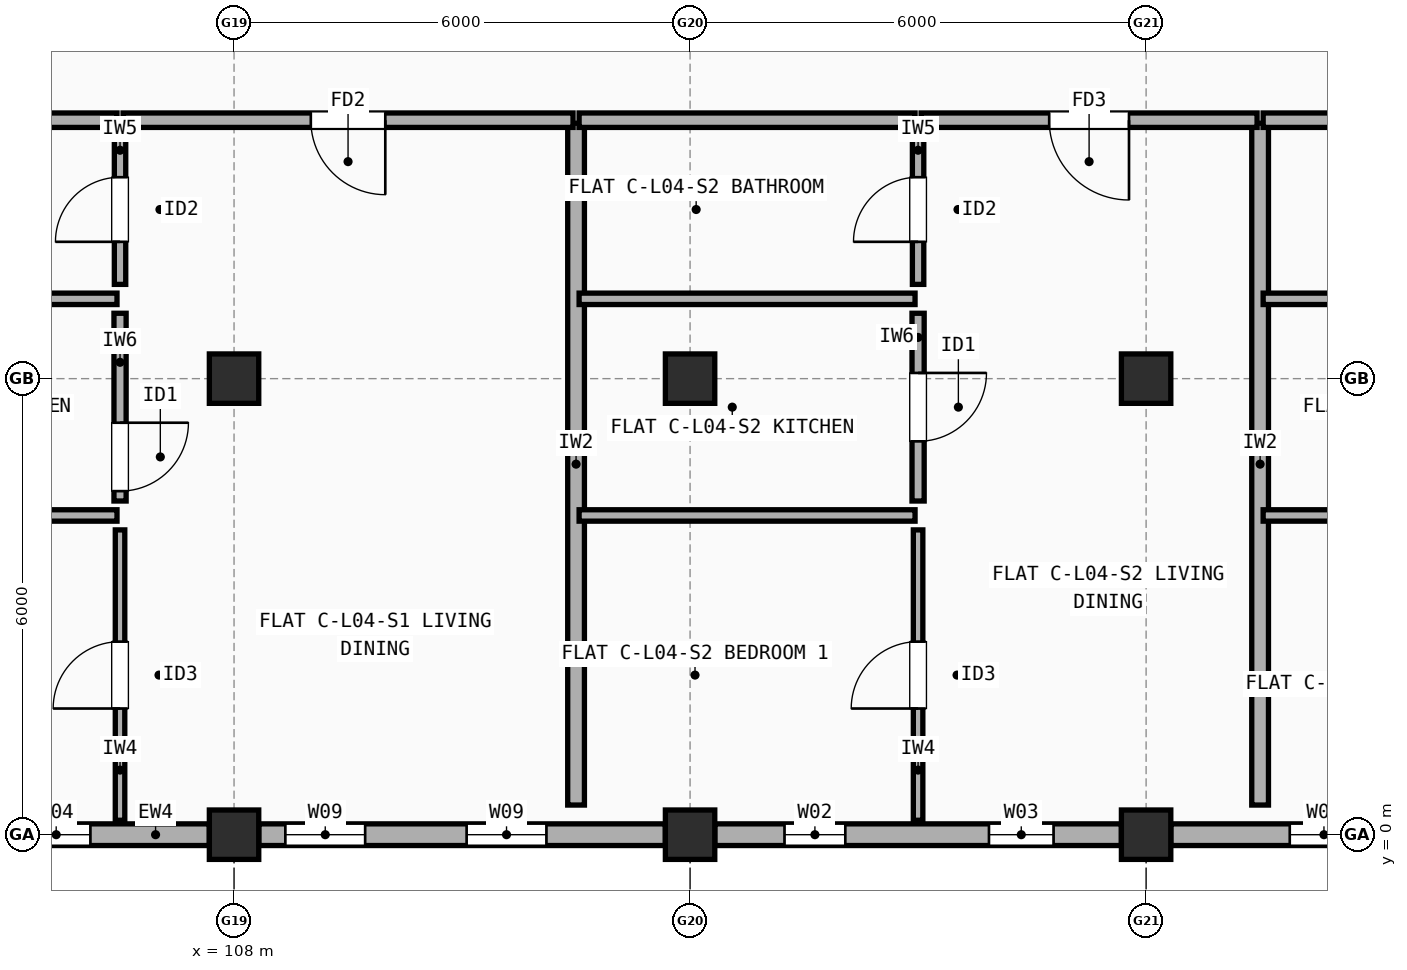
"""IFC4 building model, lengths in metres.
Left out: names, types, materials, properties, quantities, classifications, styles, units other than length and angle.
Written with IfcOpenShell. Run it as: python <this file> out.ifc"""

import sys

from ifc_helpers import new_model, si_unit, direction, frame, frame_2d, origin, origin_2d, place, context, subcontext, project, spatial, rectangle, extrude, element, fill, save


model = new_model("IFC4")
c1 = context("Model", 3, precision=1e-05, world=origin(), true_north=direction((0.0, 1.0)))
c2 = subcontext(c1, "Body", "Model", "MODEL_VIEW")
j1 = project(units=[si_unit("LENGTHUNIT", "METRE"), si_unit("PLANEANGLEUNIT", "RADIAN")], contexts=[c1])
p1 = place(None, origin())
s1 = spatial("IfcSite", under=j1, at=p1, CompositionType="ELEMENT")
p2 = place(p1, origin())
s2 = spatial("IfcBuilding", under=s1, at=p2, CompositionType="ELEMENT")
p3 = place(p2, frame((0.0, 0.0, 14.1)))
s3 = spatial("IfcBuildingStorey", under=s2, at=p3, CompositionType="ELEMENT", Elevation=14.1)
for number, where, z_axis, x_axis in (
    (1, (108.0, 0.0, 0.0), (0.0, 0.0, 1.0), (1.0, 0.0, 0.0)),
    (2, (108.0, 6.0, 0.0), (0.0, 0.0, 1.0), (1.0, 0.0, 0.0)),
    (3, (114.0, 0.0, 0.0), (0.0, 0.0, 1.0), (1.0, 0.0, 0.0)),
    (4, (114.0, 6.0, 0.0), (0.0, 0.0, 1.0), (1.0, 0.0, 0.0)),
    (5, (120.0, 0.0, 0.0), (0.0, 0.0, 1.0), (1.0, 0.0, 0.0)),
    (6, (120.0, 6.0, 0.0), (0.0, 0.0, 1.0), (1.0, 0.0, 0.0)),
):
    element("IfcColumn", number, at=place(p3, frame(where, z_axis=z_axis, x_axis=x_axis)), inside=s3, PredefinedType="COLUMN", context=c2, shape_type="SweptSolid", body=[
        extrude(rectangle(XDim=0.65, YDim=0.65, at=origin_2d()), origin(), (0.0, 0.0, 1.0), 2.95),
    ])
p4 = place(p3, frame((102.275, 0.0, 0.0), z_axis=(0.0, 0.0, 1.0), x_axis=(1.0, 0.0, 0.0)))
e7 = element("IfcWall", 7, at=p4, inside=s3, PredefinedType="STANDARD", context=c2, shape_type="SweptSolid", body=[
    extrude(rectangle(XDim=5.4, YDim=0.285, at=frame_2d((2.7, 0.0))), origin(), (0.0, 0.0, 1.0), 2.432),
])
p5 = place(p4, frame((0.35, 0.0, 0.9)))
e8 = element("IfcOpeningElement", 8, at=p5, cuts=e7, PredefinedType="OPENING", context=c2, shape_type="SweptSolid", body=[
    extrude(rectangle(XDim=0.9, YDim=1.3, at=frame_2d((0.45, 0.65))), frame((0.0, 0.152, 0.0), z_axis=(0.0, -1.0, 0.0), x_axis=(1.0, 0.0, 0.0)), (0.0, 0.0, 1.0), 0.305),
])
p6 = place(p4, frame((2.935, 0.0, 0.9)))
e9 = element("IfcOpeningElement", 9, at=p6, cuts=e7, PredefinedType="OPENING", context=c2, shape_type="SweptSolid", body=[
    extrude(rectangle(XDim=0.9, YDim=1.3, at=frame_2d((0.45, 0.65))), frame((0.0, 0.152, 0.0), z_axis=(0.0, -1.0, 0.0), x_axis=(1.0, 0.0, 0.0)), (0.0, 0.0, 1.0), 0.305),
])
p7 = place(p3, frame((108.325, 0.0, 0.0), z_axis=(0.0, 0.0, 1.0), x_axis=(1.0, 0.0, 0.0)))
e10 = element("IfcWall", 10, at=p7, inside=s3, PredefinedType="STANDARD", context=c2, shape_type="SweptSolid", body=[
    extrude(rectangle(XDim=5.35, YDim=0.285, at=frame_2d((2.675, 0.0))), origin(), (0.0, 0.0, 1.0), 2.432),
])
p8 = place(p7, frame((0.35, 0.0, 0.9)))
e11 = element("IfcOpeningElement", 11, at=p8, cuts=e10, PredefinedType="OPENING", context=c2, shape_type="SweptSolid", body=[
    extrude(rectangle(XDim=1.05, YDim=1.35, at=frame_2d((0.525, 0.675))), frame((0.0, 0.152, 0.0), z_axis=(0.0, -1.0, 0.0), x_axis=(1.0, 0.0, 0.0)), (0.0, 0.0, 1.0), 0.305),
])
p9 = place(p7, frame((2.735, 0.0, 0.9)))
e12 = element("IfcOpeningElement", 12, at=p9, cuts=e10, PredefinedType="OPENING", context=c2, shape_type="SweptSolid", body=[
    extrude(rectangle(XDim=1.05, YDim=1.35, at=frame_2d((0.525, 0.675))), frame((0.0, 0.152, 0.0), z_axis=(0.0, -1.0, 0.0), x_axis=(1.0, 0.0, 0.0)), (0.0, 0.0, 1.0), 0.305),
])
p10 = place(p3, frame((114.325, 0.0, 0.0), z_axis=(0.0, 0.0, 1.0), x_axis=(1.0, 0.0, 0.0)))
e13 = element("IfcWall", 13, at=p10, inside=s3, PredefinedType="STANDARD", context=c2, shape_type="SweptSolid", body=[
    extrude(rectangle(XDim=5.35, YDim=0.285, at=frame_2d((2.675, 0.0))), origin(), (0.0, 0.0, 1.0), 2.432),
])
p11 = place(p10, frame((0.917, 0.0, 0.9)))
e14 = element("IfcOpeningElement", 14, at=p11, cuts=e13, PredefinedType="OPENING", context=c2, shape_type="SweptSolid", body=[
    extrude(rectangle(XDim=0.8, YDim=1.2, at=frame_2d((0.4, 0.6))), frame((0.0, 0.152, 0.0), z_axis=(0.0, -1.0, 0.0), x_axis=(1.0, 0.0, 0.0)), (0.0, 0.0, 1.0), 0.305),
])
p12 = place(p10, frame((3.607, 0.0, 0.9)))
e15 = element("IfcOpeningElement", 15, at=p12, cuts=e13, PredefinedType="OPENING", context=c2, shape_type="SweptSolid", body=[
    extrude(rectangle(XDim=0.85, YDim=1.25, at=frame_2d((0.425, 0.625))), frame((0.0, 0.152, 0.0), z_axis=(0.0, -1.0, 0.0), x_axis=(1.0, 0.0, 0.0)), (0.0, 0.0, 1.0), 0.305),
])
p13 = place(p3, frame((120.325, 0.0, 0.0), z_axis=(0.0, 0.0, 1.0), x_axis=(1.0, 0.0, 0.0)))
e16 = element("IfcWall", 16, at=p13, inside=s3, PredefinedType="STANDARD", context=c2, shape_type="SweptSolid", body=[
    extrude(rectangle(XDim=5.35, YDim=0.285, at=frame_2d((2.675, 0.0))), origin(), (0.0, 0.0, 1.0), 2.432),
])
p14 = place(p13, frame((1.565, 0.0, 0.9)))
e17 = element("IfcOpeningElement", 17, at=p14, cuts=e16, PredefinedType="OPENING", context=c2, shape_type="SweptSolid", body=[
    extrude(rectangle(XDim=0.9, YDim=1.3, at=frame_2d((0.45, 0.65))), frame((0.0, 0.152, 0.0), z_axis=(0.0, -1.0, 0.0), x_axis=(1.0, 0.0, 0.0)), (0.0, 0.0, 1.0), 0.305),
])
p15 = place(p13, frame((4.1, 0.0, 0.9)))
e18 = element("IfcOpeningElement", 18, at=p15, cuts=e16, PredefinedType="OPENING", context=c2, shape_type="SweptSolid", body=[
    extrude(rectangle(XDim=0.9, YDim=1.3, at=frame_2d((0.45, 0.65))), frame((0.0, 0.152, 0.0), z_axis=(0.0, -1.0, 0.0), x_axis=(1.0, 0.0, 0.0)), (0.0, 0.0, 1.0), 0.305),
])
p16 = place(p3, frame((112.5, 0.39, 0.0), z_axis=(0.0, 0.0, 1.0), x_axis=(0.0, 1.0, 0.0)))
e19 = element("IfcWall", 19, at=p16, inside=s3, PredefinedType="SOLIDWALL", context=c2, shape_type="SweptSolid", body=[
    extrude(rectangle(XDim=8.97, YDim=0.22, at=frame_2d((4.485, 0.0))), origin(), (0.0, 0.0, 1.0), 2.432),
])
p17 = place(p3, frame((102.04, 9.4, 0.0), z_axis=(0.0, 0.0, 1.0), x_axis=(1.0, 0.0, 0.0)))
e20 = element("IfcWall", 20, at=p17, inside=s3, PredefinedType="SOLIDWALL", context=c2, shape_type="SweptSolid", body=[
    extrude(rectangle(XDim=4.42, YDim=0.19, at=frame_2d((2.21, 0.0))), origin(), (0.0, 0.0, 1.0), 2.432),
])
p18 = place(p3, frame((106.54, 9.4, 0.0), z_axis=(0.0, 0.0, 1.0), x_axis=(1.0, 0.0, 0.0)))
e21 = element("IfcWall", 21, at=p18, inside=s3, PredefinedType="SOLIDWALL", context=c2, shape_type="SweptSolid", body=[
    extrude(rectangle(XDim=5.92, YDim=0.19, at=frame_2d((2.96, 0.0))), origin(), (0.0, 0.0, 1.0), 2.458),
])
p19 = place(p18, frame((2.47, 0.0, 0.0)))
e22 = element("IfcOpeningElement", 22, at=p19, cuts=e21, PredefinedType="OPENING", context=c2, shape_type="SweptSolid", body=[
    extrude(rectangle(XDim=0.98, YDim=2.15, at=frame_2d((0.49, 1.075))), frame((0.0, 0.105, 0.0), z_axis=(0.0, -1.0, 0.0), x_axis=(1.0, 0.0, 0.0)), (0.0, 0.0, 1.0), 0.21),
])
p20 = place(p3, frame((106.5, 0.19, 0.0), z_axis=(0.0, 0.0, 1.0), x_axis=(0.0, 1.0, 0.0)))
e23 = element("IfcWall", 23, at=p20, inside=s3, PredefinedType="PARTITIONING", context=c2, shape_type="SweptSolid", body=[
    extrude(rectangle(XDim=3.82, YDim=0.125, at=frame_2d((1.91, 0.0))), origin(), (0.0, 0.0, 1.0), 2.95),
])
p21 = place(p20, frame((1.47, 0.0, 0.0)))
e24 = element("IfcOpeningElement", 24, at=p21, cuts=e23, PredefinedType="OPENING", context=c2, shape_type="SweptSolid", body=[
    extrude(rectangle(XDim=0.88, YDim=2.1, at=frame_2d((0.44, 1.05))), frame((0.0, 0.073, 0.0), z_axis=(0.0, -1.0, 0.0), x_axis=(1.0, 0.0, 0.0)), (0.0, 0.0, 1.0), 0.145),
])
p22 = place(p3, frame((106.5, 4.39, 0.0), z_axis=(0.0, 0.0, 1.0), x_axis=(0.0, 1.0, 0.0)))
e25 = element("IfcWall", 25, at=p22, inside=s3, PredefinedType="PLUMBINGWALL", context=c2, shape_type="SweptSolid", body=[
    extrude(rectangle(XDim=2.47, YDim=0.16, at=frame_2d((1.235, 0.0))), origin(), (0.0, 0.0, 1.0), 2.432),
])
p23 = place(p22, frame((0.13, 0.0, 0.0)))
e26 = element("IfcOpeningElement", 26, at=p23, cuts=e25, PredefinedType="OPENING", context=c2, shape_type="SweptSolid", body=[
    extrude(rectangle(XDim=0.9, YDim=2.1, at=frame_2d((0.45, 1.05))), frame((0.0, 0.09, 0.0), z_axis=(0.0, -1.0, 0.0), x_axis=(1.0, 0.0, 0.0)), (0.0, 0.0, 1.0), 0.18),
])
p24 = place(p3, frame((106.5, 7.24, 0.0), z_axis=(0.0, 0.0, 1.0), x_axis=(0.0, 1.0, 0.0)))
e27 = element("IfcWall", 27, at=p24, inside=s3, PredefinedType="PARTITIONING", context=c2, shape_type="SweptSolid", body=[
    extrude(rectangle(XDim=1.97, YDim=0.15, at=frame_2d((0.985, 0.0))), origin(), (0.0, 0.0, 1.0), 2.95),
])
p25 = place(p24, frame((0.56, 0.0, 0.0)))
e28 = element("IfcOpeningElement", 28, at=p25, cuts=e27, PredefinedType="OPENING", context=c2, shape_type="SweptSolid", body=[
    extrude(rectangle(XDim=0.85, YDim=2.1, at=frame_2d((0.425, 1.05))), frame((0.0, 0.085, 0.0), z_axis=(0.0, -1.0, 0.0), x_axis=(1.0, 0.0, 0.0)), (0.0, 0.0, 1.0), 0.17),
])
for number, where, z_axis, x_axis in (
    (29, (102.04, 4.2, 0.0), (0.0, 0.0, 1.0), (1.0, 0.0, 0.0)),
    (30, (102.04, 7.05, 0.0), (0.0, 0.0, 1.0), (1.0, 0.0, 0.0)),
):
    element("IfcWall", number, at=place(p3, frame(where, z_axis=z_axis, x_axis=x_axis)), inside=s3, PredefinedType="PARTITIONING", context=c2, shape_type="SweptSolid", body=[
        extrude(rectangle(XDim=4.42, YDim=0.15, at=frame_2d((2.21, 0.0))), origin(), (0.0, 0.0, 1.0), 2.432),
    ])
p26 = place(p3, frame((121.5, 0.39, 0.0), z_axis=(0.0, 0.0, 1.0), x_axis=(0.0, 1.0, 0.0)))
e31 = element("IfcWall", 31, at=p26, inside=s3, PredefinedType="SOLIDWALL", context=c2, shape_type="SweptSolid", body=[
    extrude(rectangle(XDim=8.97, YDim=0.22, at=frame_2d((4.485, 0.0))), origin(), (0.0, 0.0, 1.0), 2.432),
])
p27 = place(p3, frame((112.54, 9.4, 0.0), z_axis=(0.0, 0.0, 1.0), x_axis=(1.0, 0.0, 0.0)))
e32 = element("IfcWall", 32, at=p27, inside=s3, PredefinedType="SOLIDWALL", context=c2, shape_type="SweptSolid", body=[
    extrude(rectangle(XDim=4.42, YDim=0.19, at=frame_2d((2.21, 0.0))), origin(), (0.0, 0.0, 1.0), 2.548),
])
p28 = place(p3, frame((117.04, 9.4, 0.0), z_axis=(0.0, 0.0, 1.0), x_axis=(1.0, 0.0, 0.0)))
e33 = element("IfcWall", 33, at=p28, inside=s3, PredefinedType="SOLIDWALL", context=c2, shape_type="SweptSolid", body=[
    extrude(rectangle(XDim=4.42, YDim=0.19, at=frame_2d((2.21, 0.0))), origin(), (0.0, 0.0, 1.0), 2.458),
])
p29 = place(p28, frame((1.685, 0.0, 0.0)))
e34 = element("IfcOpeningElement", 34, at=p29, cuts=e33, PredefinedType="OPENING", context=c2, shape_type="SweptSolid", body=[
    extrude(rectangle(XDim=1.05, YDim=2.15, at=frame_2d((0.525, 1.075))), frame((0.0, 0.105, 0.0), z_axis=(0.0, -1.0, 0.0), x_axis=(1.0, 0.0, 0.0)), (0.0, 0.0, 1.0), 0.21),
])
p30 = place(p3, frame((117.0, 0.19, 0.0), z_axis=(0.0, 0.0, 1.0), x_axis=(0.0, 1.0, 0.0)))
e35 = element("IfcWall", 35, at=p30, inside=s3, PredefinedType="PARTITIONING", context=c2, shape_type="SweptSolid", body=[
    extrude(rectangle(XDim=3.82, YDim=0.125, at=frame_2d((1.91, 0.0))), origin(), (0.0, 0.0, 1.0), 2.95),
])
p31 = place(p30, frame((1.47, 0.0, 0.0)))
e36 = element("IfcOpeningElement", 36, at=p31, cuts=e35, PredefinedType="OPENING", context=c2, shape_type="SweptSolid", body=[
    extrude(rectangle(XDim=0.88, YDim=2.1, at=frame_2d((0.44, 1.05))), frame((0.0, 0.073, 0.0), z_axis=(0.0, -1.0, 0.0), x_axis=(1.0, 0.0, 0.0)), (0.0, 0.0, 1.0), 0.145),
])
p32 = place(p3, frame((117.0, 4.39, 0.0), z_axis=(0.0, 0.0, 1.0), x_axis=(0.0, 1.0, 0.0)))
e37 = element("IfcWall", 37, at=p32, inside=s3, PredefinedType="PLUMBINGWALL", context=c2, shape_type="SweptSolid", body=[
    extrude(rectangle(XDim=2.47, YDim=0.16, at=frame_2d((1.235, 0.0))), origin(), (0.0, 0.0, 1.0), 2.432),
])
p33 = place(p32, frame((0.785, 0.0, 0.0)))
e38 = element("IfcOpeningElement", 38, at=p33, cuts=e37, PredefinedType="OPENING", context=c2, shape_type="SweptSolid", body=[
    extrude(rectangle(XDim=0.9, YDim=2.1, at=frame_2d((0.45, 1.05))), frame((0.0, 0.09, 0.0), z_axis=(0.0, -1.0, 0.0), x_axis=(1.0, 0.0, 0.0)), (0.0, 0.0, 1.0), 0.18),
])
p34 = place(p3, frame((117.0, 7.24, 0.0), z_axis=(0.0, 0.0, 1.0), x_axis=(0.0, 1.0, 0.0)))
e39 = element("IfcWall", 39, at=p34, inside=s3, PredefinedType="PARTITIONING", context=c2, shape_type="SweptSolid", body=[
    extrude(rectangle(XDim=1.97, YDim=0.15, at=frame_2d((0.985, 0.0))), origin(), (0.0, 0.0, 1.0), 2.95),
])
p35 = place(p34, frame((0.56, 0.0, 0.0)))
e40 = element("IfcOpeningElement", 40, at=p35, cuts=e39, PredefinedType="OPENING", context=c2, shape_type="SweptSolid", body=[
    extrude(rectangle(XDim=0.85, YDim=2.1, at=frame_2d((0.425, 1.05))), frame((0.0, 0.085, 0.0), z_axis=(0.0, -1.0, 0.0), x_axis=(1.0, 0.0, 0.0)), (0.0, 0.0, 1.0), 0.17),
])
p36 = place(p3, frame((112.54, 4.2, 0.0), z_axis=(0.0, 0.0, 1.0), x_axis=(1.0, 0.0, 0.0)))
e41 = element("IfcWall", 41, at=p36, inside=s3, PredefinedType="PARTITIONING", context=c2, shape_type="SweptSolid", body=[
    extrude(rectangle(XDim=4.42, YDim=0.15, at=frame_2d((2.21, 0.0))), origin(), (0.0, 0.0, 1.0), 2.458),
])
p37 = place(p3, frame((112.54, 7.05, 0.0), z_axis=(0.0, 0.0, 1.0), x_axis=(1.0, 0.0, 0.0)))
e42 = element("IfcWall", 42, at=p37, inside=s3, PredefinedType="PARTITIONING", context=c2, shape_type="SweptSolid", body=[
    extrude(rectangle(XDim=4.42, YDim=0.15, at=frame_2d((2.21, 0.0))), origin(), (0.0, 0.0, 1.0), 2.548),
])
p38 = place(p3, frame((121.54, 9.4, 0.0), z_axis=(0.0, 0.0, 1.0), x_axis=(1.0, 0.0, 0.0)))
e43 = element("IfcWall", 43, at=p38, inside=s3, PredefinedType="SOLIDWALL", context=c2, shape_type="SweptSolid", body=[
    extrude(rectangle(XDim=4.42, YDim=0.19, at=frame_2d((2.21, 0.0))), origin(), (0.0, 0.0, 1.0), 2.548),
])
p39 = place(p3, frame((121.54, 4.2, 0.0), z_axis=(0.0, 0.0, 1.0), x_axis=(1.0, 0.0, 0.0)))
e44 = element("IfcWall", 44, at=p39, inside=s3, PredefinedType="PARTITIONING", context=c2, shape_type="SweptSolid", body=[
    extrude(rectangle(XDim=4.42, YDim=0.15, at=frame_2d((2.21, 0.0))), origin(), (0.0, 0.0, 1.0), 2.458),
])
p40 = place(p3, frame((121.54, 7.05, 0.0), z_axis=(0.0, 0.0, 1.0), x_axis=(1.0, 0.0, 0.0)))
e45 = element("IfcWall", 45, at=p40, inside=s3, PredefinedType="PARTITIONING", context=c2, shape_type="SweptSolid", body=[
    extrude(rectangle(XDim=4.42, YDim=0.15, at=frame_2d((2.21, 0.0))), origin(), (0.0, 0.0, 1.0), 2.548),
])
p41 = place(p6, origin())
e46 = element("IfcWindow", 46, at=p41, inside=s3, PartitioningType="SINGLE_PANEL", PredefinedType="WINDOW", context=c2, shape_type="SweptSolid", body=[
    extrude(rectangle(XDim=0.9, YDim=1.3, at=frame_2d((0.45, 0.65))), frame((0.0, 0.03, 0.0), z_axis=(0.0, -1.0, 0.0), x_axis=(1.0, 0.0, 0.0)), (0.0, 0.0, 1.0), 0.06),
])
fill(e9, e46)
p42 = place(p8, origin())
e47 = element("IfcWindow", 47, at=p42, inside=s3, PartitioningType="SINGLE_PANEL", PredefinedType="WINDOW", context=c2, shape_type="SweptSolid", body=[
    extrude(rectangle(XDim=1.05, YDim=1.35, at=frame_2d((0.525, 0.675))), frame((0.0, 0.03, 0.0), z_axis=(0.0, -1.0, 0.0), x_axis=(1.0, 0.0, 0.0)), (0.0, 0.0, 1.0), 0.06),
])
fill(e11, e47)
p43 = place(p9, origin())
e48 = element("IfcWindow", 48, at=p43, inside=s3, PartitioningType="SINGLE_PANEL", PredefinedType="WINDOW", context=c2, shape_type="SweptSolid", body=[
    extrude(rectangle(XDim=1.05, YDim=1.35, at=frame_2d((0.525, 0.675))), frame((0.0, 0.03, 0.0), z_axis=(0.0, -1.0, 0.0), x_axis=(1.0, 0.0, 0.0)), (0.0, 0.0, 1.0), 0.06),
])
fill(e12, e48)
p44 = place(p11, origin())
e49 = element("IfcWindow", 49, at=p44, inside=s3, PartitioningType="SINGLE_PANEL", PredefinedType="WINDOW", context=c2, shape_type="SweptSolid", body=[
    extrude(rectangle(XDim=0.8, YDim=1.2, at=frame_2d((0.4, 0.6))), frame((0.0, 0.03, 0.0), z_axis=(0.0, -1.0, 0.0), x_axis=(1.0, 0.0, 0.0)), (0.0, 0.0, 1.0), 0.06),
])
fill(e14, e49)
p45 = place(p12, origin())
e50 = element("IfcWindow", 50, at=p45, inside=s3, PartitioningType="SINGLE_PANEL", PredefinedType="WINDOW", context=c2, shape_type="SweptSolid", body=[
    extrude(rectangle(XDim=0.85, YDim=1.25, at=frame_2d((0.425, 0.625))), frame((0.0, 0.03, 0.0), z_axis=(0.0, -1.0, 0.0), x_axis=(1.0, 0.0, 0.0)), (0.0, 0.0, 1.0), 0.06),
])
fill(e15, e50)
p46 = place(p14, origin())
e51 = element("IfcWindow", 51, at=p46, inside=s3, PartitioningType="SINGLE_PANEL", PredefinedType="WINDOW", context=c2, shape_type="SweptSolid", body=[
    extrude(rectangle(XDim=0.9, YDim=1.3, at=frame_2d((0.45, 0.65))), frame((0.0, 0.03, 0.0), z_axis=(0.0, -1.0, 0.0), x_axis=(1.0, 0.0, 0.0)), (0.0, 0.0, 1.0), 0.06),
])
fill(e17, e51)
p47 = place(p19, origin())
e52 = element("IfcDoor", 52, at=p47, inside=s3, OperationType="SINGLE_SWING_RIGHT", PredefinedType="DOOR", context=c2, shape_type="SweptSolid", body=[
    extrude(rectangle(XDim=0.98, YDim=2.15, at=frame_2d((0.49, 1.075))), frame((0.0, 0.025, 0.0), z_axis=(0.0, -1.0, 0.0), x_axis=(1.0, 0.0, 0.0)), (0.0, 0.0, 1.0), 0.05),
])
fill(e22, e52)
p48 = place(p21, origin())
e53 = element("IfcDoor", 53, at=p48, inside=s3, OperationType="SINGLE_SWING_LEFT", PredefinedType="DOOR", context=c2, shape_type="SweptSolid", body=[
    extrude(rectangle(XDim=0.88, YDim=2.1, at=frame_2d((0.44, 1.05))), frame((0.0, 0.025, 0.0), z_axis=(0.0, -1.0, 0.0), x_axis=(1.0, 0.0, 0.0)), (0.0, 0.0, 1.0), 0.05),
])
fill(e24, e53)
p49 = place(p23, origin())
e54 = element("IfcDoor", 54, at=p49, inside=s3, OperationType="SINGLE_SWING_RIGHT", PredefinedType="DOOR", context=c2, shape_type="SweptSolid", body=[
    extrude(rectangle(XDim=0.9, YDim=2.1, at=frame_2d((0.45, 1.05))), frame((0.0, 0.025, 0.0), z_axis=(0.0, -1.0, 0.0), x_axis=(1.0, 0.0, 0.0)), (0.0, 0.0, 1.0), 0.05),
])
fill(e26, e54)
p50 = place(p25, origin())
e55 = element("IfcDoor", 55, at=p50, inside=s3, OperationType="SINGLE_SWING_LEFT", PredefinedType="DOOR", context=c2, shape_type="SweptSolid", body=[
    extrude(rectangle(XDim=0.85, YDim=2.1, at=frame_2d((0.425, 1.05))), frame((0.0, 0.025, 0.0), z_axis=(0.0, -1.0, 0.0), x_axis=(1.0, 0.0, 0.0)), (0.0, 0.0, 1.0), 0.05),
])
fill(e28, e55)
p51 = place(p29, origin())
e56 = element("IfcDoor", 56, at=p51, inside=s3, OperationType="SINGLE_SWING_RIGHT", PredefinedType="DOOR", context=c2, shape_type="SweptSolid", body=[
    extrude(rectangle(XDim=1.05, YDim=2.15, at=frame_2d((0.525, 1.075))), frame((0.0, 0.025, 0.0), z_axis=(0.0, -1.0, 0.0), x_axis=(1.0, 0.0, 0.0)), (0.0, 0.0, 1.0), 0.05),
])
fill(e34, e56)
p52 = place(p31, origin())
e57 = element("IfcDoor", 57, at=p52, inside=s3, OperationType="SINGLE_SWING_LEFT", PredefinedType="DOOR", context=c2, shape_type="SweptSolid", body=[
    extrude(rectangle(XDim=0.88, YDim=2.1, at=frame_2d((0.44, 1.05))), frame((0.0, 0.025, 0.0), z_axis=(0.0, -1.0, 0.0), x_axis=(1.0, 0.0, 0.0)), (0.0, 0.0, 1.0), 0.05),
])
fill(e36, e57)
p53 = place(p33, origin())
e58 = element("IfcDoor", 58, at=p53, inside=s3, OperationType="SINGLE_SWING_RIGHT", PredefinedType="DOOR", context=c2, shape_type="SweptSolid", body=[
    extrude(rectangle(XDim=0.9, YDim=2.1, at=frame_2d((0.45, 1.05))), frame((0.0, 0.025, 0.0), z_axis=(0.0, -1.0, 0.0), x_axis=(1.0, 0.0, 0.0)), (0.0, 0.0, 1.0), 0.05),
])
fill(e38, e58)
p54 = place(p35, origin())
e59 = element("IfcDoor", 59, at=p54, inside=s3, OperationType="SINGLE_SWING_LEFT", PredefinedType="DOOR", context=c2, shape_type="SweptSolid", body=[
    extrude(rectangle(XDim=0.85, YDim=2.1, at=frame_2d((0.425, 1.05))), frame((0.0, 0.025, 0.0), z_axis=(0.0, -1.0, 0.0), x_axis=(1.0, 0.0, 0.0)), (0.0, 0.0, 1.0), 0.05),
])
fill(e40, e59)
save(model, sys.argv[1])
